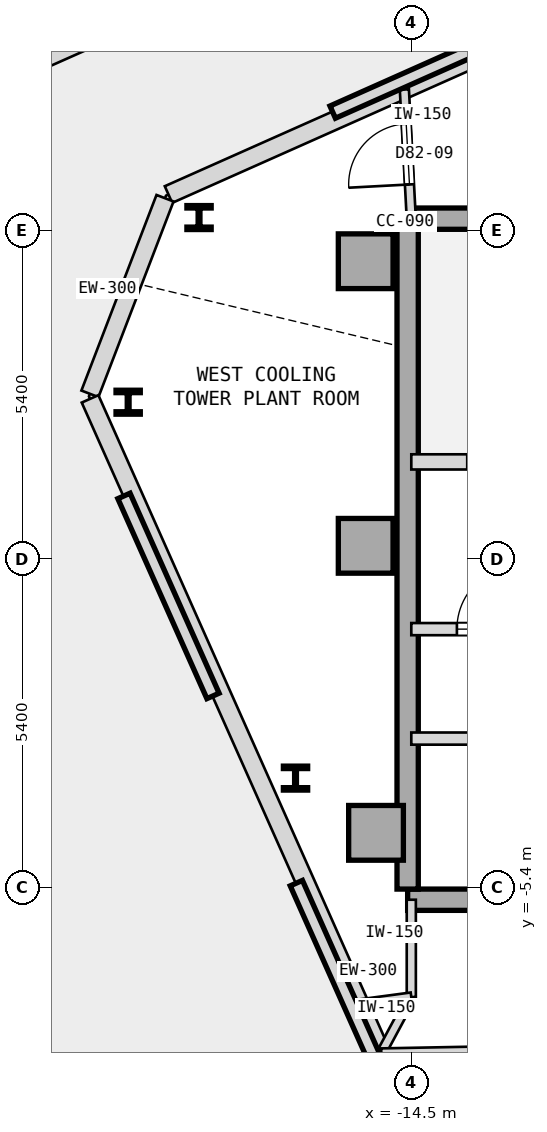
"""IFC4 building model, lengths in metres.
Left out: names, types, materials, properties, quantities, classifications, styles, units other than length and angle.
Written with IfcOpenShell. Run it as: python <this file> out.ifc"""

import sys

from ifc_helpers import new_model, si_unit, direction, frame, frame_2d, origin, origin_2d, place, context, subcontext, project, spatial, rectangle, i_section, extrude, element, fill, save


model = new_model("IFC4")
c1 = context("Model", 3, precision=1e-05, world=origin(), true_north=direction((0.0, 1.0)))
c2 = subcontext(c1, "Body", "Model", "MODEL_VIEW")
j1 = project(units=[si_unit("LENGTHUNIT", "METRE"), si_unit("PLANEANGLEUNIT", "RADIAN")], contexts=[c1])
p1 = place(None, origin())
s1 = spatial("IfcSite", under=j1, at=p1, CompositionType="ELEMENT")
p2 = place(p1, origin())
s2 = spatial("IfcBuilding", under=s1, at=p2, CompositionType="ELEMENT")
p3 = place(p2, frame((0.0, 0.0, 305.55)))
s3 = spatial("IfcBuildingStorey", under=s2, at=p3, CompositionType="ELEMENT", Elevation=305.55)
for number, where, z_axis, x_axis in (
    (1, (-15.25, 4.9, 0.0), (0.0, 0.0, 1.0), (1.0, 0.0, 0.0)),
    (2, (-15.25, 0.22, 0.0), (0.0, 0.0, 1.0), (1.0, 0.0, 0.0)),
    (3, (-15.08, -4.5, 0.0), (0.0, 0.0, 1.0), (1.0, 0.0, 0.0)),
):
    element("IfcColumn", number, at=place(p3, frame(where, z_axis=z_axis, x_axis=x_axis)), inside=s3, PredefinedType="COLUMN", context=c2, shape_type="SweptSolid", body=[
        extrude(rectangle(XDim=0.9, YDim=0.9, at=origin_2d()), origin(), (0.0, 0.0, 1.0), 6.45),
    ])
p4 = place(p3, frame((-14.56, 5.6, 0.0), z_axis=(0.0, 0.0, 1.0), x_axis=(1.0, 0.0, 0.0)))
e4 = element("IfcWall", 4, at=p4, inside=s3, PredefinedType="SHEAR", context=c2, shape_type="SweptSolid", body=[
    extrude(rectangle(XDim=11.41, YDim=0.35, at=frame_2d((5.705, 0.0))), origin(), (0.0, 0.0, 1.0), 6.1),
])
p5 = place(p3, frame((-14.56, -5.6, 0.0), z_axis=(0.0, 0.0, 1.0), x_axis=(1.0, 0.0, 0.0)))
e5 = element("IfcWall", 5, at=p5, inside=s3, PredefinedType="SHEAR", context=c2, shape_type="SweptSolid", body=[
    extrude(rectangle(XDim=10.86, YDim=0.35, at=frame_2d((5.43, 0.0))), origin(), (0.0, 0.0, 1.0), 6.1),
])
p6 = place(p3, frame((-14.56, -5.425, 0.0), z_axis=(0.0, 0.0, 1.0), x_axis=(0.0, 1.0, 0.0)))
e6 = element("IfcWall", 6, at=p6, inside=s3, PredefinedType="SHEAR", context=c2, shape_type="SweptSolid", body=[
    extrude(rectangle(XDim=10.85, YDim=0.35, at=frame_2d((5.425, 0.0))), origin(), (0.0, 0.0, 1.0), 6.1),
])
for number, where, z_axis, x_axis in (
    (7, (-17.99, 5.618, 0.0), (0.0, 0.0, 1.0), (1.0, 0.0, 0.0)),
    (8, (-19.156, 2.582, 0.0), (0.0, 0.0, 1.0), (1.0, 0.0, 0.0)),
    (9, (-16.404, -3.6, 0.0), (0.0, 0.0, 1.0), (1.0, 0.0, 0.0)),
):
    element("IfcColumn", number, at=place(p3, frame(where, z_axis=z_axis, x_axis=x_axis)), inside=s3, PredefinedType="COLUMN", context=c2, shape_type="SweptSolid", body=[
        extrude(i_section(OverallWidth=0.399, OverallDepth=0.394, WebThickness=0.023, FlangeThickness=0.037, FilletRadius=0.015, at=origin_2d()), origin(), (0.0, 0.0, 1.0), 6.45),
    ])
p7 = place(p3, frame((7.918, 17.756, 0.0), z_axis=(0.0, 0.0, 1.0), x_axis=(-0.913542158844, -0.406744052217, 0.0)))
e10 = element("IfcWall", 10, at=p7, inside=s3, PredefinedType="STANDARD", context=c2, shape_type="SweptSolid", body=[
    extrude(rectangle(XDim=28.91, YDim=0.3, at=frame_2d((14.455, 0.0))), origin(), (0.0, 0.0, 1.0), 6.1),
])
p8 = place(p3, frame((-18.55, 5.936, 0.0), z_axis=(0.0, 0.0, 1.0), x_axis=(-0.358404469556, -0.933566406959, 0.0)))
e11 = element("IfcWall", 11, at=p8, inside=s3, PredefinedType="STANDARD", context=c2, shape_type="SweptSolid", body=[
    extrude(rectangle(XDim=3.446, YDim=0.3, at=frame_2d((1.723, 0.0))), origin(), (0.0, 0.0, 1.0), 6.1),
])
p9 = place(p3, frame((-19.783, 2.637, 0.0), z_axis=(0.0, 0.0, 1.0), x_axis=(0.406736369999, -0.913545579224, 0.0)))
e12 = element("IfcWall", 12, at=p9, inside=s3, PredefinedType="STANDARD", context=c2, shape_type="SweptSolid", body=[
    extrude(rectangle(XDim=20.91, YDim=0.3, at=frame_2d((10.455, 0.0))), origin(), (0.0, 0.0, 1.0), 6.1),
])
p10 = place(p3, frame((18.04, 25.361, 0.0), z_axis=(0.0, 0.0, 1.0), x_axis=(-0.913545087995, -0.406737473317, 0.0)))
e13 = element("IfcWall", 13, at=p10, inside=s3, PredefinedType="PARAPET", context=c2, shape_type="SweptSolid", body=[
    extrude(rectangle(XDim=51.158, YDim=0.22, at=frame_2d((25.579, 0.0))), origin(), (0.0, 0.0, 1.0), 1.2),
])
p11 = place(p3, frame((-30.176, 0.697, 0.0), z_axis=(0.0, 0.0, 1.0), x_axis=(0.406735007391, -0.913546185895, 0.0)))
e14 = element("IfcWall", 14, at=p11, inside=s3, PredefinedType="PARAPET", context=c2, shape_type="SweptSolid", body=[
    extrude(rectangle(XDim=32.158, YDim=0.22, at=frame_2d((16.079, 0.0))), origin(), (0.0, 0.0, 1.0), 1.2),
])
p12 = place(p3, frame((-14.5, 1.6, 0.0), z_axis=(0.0, 0.0, 1.0), x_axis=(1.0, 0.0, 0.0)))
e15 = element("IfcWall", 15, at=p12, inside=s3, PredefinedType="STANDARD", context=c2, shape_type="SweptSolid", body=[
    extrude(rectangle(XDim=3.6, YDim=0.25, at=frame_2d((1.8, 0.0))), origin(), (0.0, 0.0, 1.0), 6.1),
])
p13 = place(p12, frame((0.92, 0.0, 0.0)))
e16 = element("IfcOpeningElement", 16, at=p13, cuts=e15, PredefinedType="OPENING", context=c2, shape_type="SweptSolid", body=[
    extrude(rectangle(XDim=1.05, YDim=2.15, at=frame_2d((0.525, 1.075))), frame((0.0, 0.135, 0.0), z_axis=(0.0, -1.0, 0.0), x_axis=(1.0, 0.0, 0.0)), (0.0, 0.0, 1.0), 0.27),
])
p14 = place(p3, frame((-14.5, -1.15, 0.0), z_axis=(0.0, 0.0, 1.0), x_axis=(1.0, 0.0, 0.0)))
e17 = element("IfcWall", 17, at=p14, inside=s3, PredefinedType="STANDARD", context=c2, shape_type="SweptSolid", body=[
    extrude(rectangle(XDim=2.95, YDim=0.2, at=frame_2d((1.475, 0.0))), origin(), (0.0, 0.0, 1.0), 6.1),
])
p15 = place(p14, frame((0.75, 0.0, 0.0)))
e18 = element("IfcOpeningElement", 18, at=p15, cuts=e17, PredefinedType="OPENING", context=c2, shape_type="SweptSolid", body=[
    extrude(rectangle(XDim=1.05, YDim=2.18, at=frame_2d((0.525, 1.09))), frame((0.0, 0.11, 0.0), z_axis=(0.0, -1.0, 0.0), x_axis=(1.0, 0.0, 0.0)), (0.0, 0.0, 1.0), 0.22),
])
p16 = place(p3, frame((-14.5, -2.95, 0.0), z_axis=(0.0, 0.0, 1.0), x_axis=(1.0, 0.0, 0.0)))
e19 = element("IfcWall", 19, at=p16, inside=s3, PredefinedType="STANDARD", context=c2, shape_type="SweptSolid", body=[
    extrude(rectangle(XDim=10.8, YDim=0.2, at=frame_2d((5.4, 0.0))), origin(), (0.0, 0.0, 1.0), 6.1),
])
p17 = place(p16, frame((1.73, 0.0, 0.0)))
e20 = element("IfcOpeningElement", 20, at=p17, cuts=e19, PredefinedType="OPENING", context=c2, shape_type="SweptSolid", body=[
    extrude(rectangle(XDim=0.92, YDim=2.15, at=frame_2d((0.46, 1.075))), frame((0.0, 0.11, 0.0), z_axis=(0.0, -1.0, 0.0), x_axis=(1.0, 0.0, 0.0)), (0.0, 0.0, 1.0), 0.22),
])
p18 = place(p16, frame((6.05, 0.0, 0.0)))
e21 = element("IfcOpeningElement", 21, at=p18, cuts=e19, PredefinedType="OPENING", context=c2, shape_type="SweptSolid", body=[
    extrude(rectangle(XDim=0.92, YDim=2.15, at=frame_2d((0.46, 1.075))), frame((0.0, 0.11, 0.0), z_axis=(0.0, -1.0, 0.0), x_axis=(1.0, 0.0, 0.0)), (0.0, 0.0, 1.0), 0.22),
])
p19 = place(p3, frame((-14.5, -7.2, 0.0), z_axis=(0.0, 0.0, 1.0), x_axis=(0.0, 1.0, 0.0)))
e22 = element("IfcWall", 22, at=p19, inside=s3, PredefinedType="PARTITIONING", context=c2, shape_type="SweptSolid", body=[
    extrude(rectangle(XDim=1.6, YDim=0.15, at=frame_2d((0.8, 0.0))), origin(), (0.0, 0.0, 1.0), 6.1),
])
p20 = place(p3, frame((-14.5, 5.6, 0.0), z_axis=(0.0, 0.0, 1.0), x_axis=(-0.053607139023, 0.99856210355, 0.0)))
e23 = element("IfcWall", 23, at=p20, inside=s3, PredefinedType="PARTITIONING", context=c2, shape_type="SweptSolid", body=[
    extrude(rectangle(XDim=2.127, YDim=0.15, at=frame_2d((1.063, 0.0))), origin(), (0.0, 0.0, 1.0), 6.1),
])
p21 = place(p20, frame((0.563, 0.0, 0.0)))
e24 = element("IfcOpeningElement", 24, at=p21, cuts=e23, PredefinedType="OPENING", context=c2, shape_type="SweptSolid", body=[
    extrude(rectangle(XDim=1.0, YDim=2.15, at=frame_2d((0.5, 1.075))), frame((0.0, 0.085, 0.0), z_axis=(0.0, -1.0, 0.0), x_axis=(1.0, 0.0, 0.0)), (0.0, 0.0, 1.0), 0.17),
])
p22 = place(p3, frame((-14.994, -8.12, 0.0), z_axis=(0.0, 0.0, 1.0), x_axis=(0.472844275985, 0.881146009847, 0.0)))
e25 = element("IfcWall", 25, at=p22, inside=s3, PredefinedType="PARTITIONING", context=c2, shape_type="SweptSolid", body=[
    extrude(rectangle(XDim=1.044, YDim=0.15, at=frame_2d((0.522, 0.0))), origin(), (0.0, 0.0, 1.0), 6.1),
])
p23 = place(p3, frame((-14.994, -8.12, 0.0), z_axis=(0.0, 0.0, 1.0), x_axis=(0.99981691014, 0.019134947025, 0.0)))
e26 = element("IfcWall", 26, at=p23, inside=s3, PredefinedType="PARTITIONING", context=c2, shape_type="SweptSolid", body=[
    extrude(rectangle(XDim=11.496, YDim=0.15, at=frame_2d((5.748, 0.0))), origin(), (0.0, 0.0, 1.0), 6.1),
])
p24 = place(p23, frame((6.972, 0.0, 0.0)))
e27 = element("IfcOpeningElement", 27, at=p24, cuts=e26, PredefinedType="OPENING", context=c2, shape_type="SweptSolid", body=[
    extrude(rectangle(XDim=1.0, YDim=2.15, at=frame_2d((0.5, 1.075))), frame((0.0, 0.085, 0.0), z_axis=(0.0, -1.0, 0.0), x_axis=(1.0, 0.0, 0.0)), (0.0, 0.0, 1.0), 0.17),
])
p25 = place(p3, frame((-15.353, -7.314, 0.0), z_axis=(0.0, 0.0, 1.0), x_axis=(0.991213020037, 0.132275277015, 0.0)))
e28 = element("IfcWall", 28, at=p25, inside=s3, PredefinedType="PARTITIONING", context=c2, shape_type="SweptSolid", body=[
    extrude(rectangle(XDim=0.86, YDim=0.15, at=frame_2d((0.43, 0.0))), origin(), (0.0, 0.0, 1.0), 6.1),
])
p26 = place(p15, origin())
e29 = element("IfcDoor", 29, at=p26, inside=s3, OperationType="SINGLE_SWING_RIGHT", PredefinedType="DOOR", context=c2, shape_type="SweptSolid", body=[
    extrude(rectangle(XDim=1.05, YDim=2.18, at=frame_2d((0.525, 1.09))), frame((0.0, 0.025, 0.0), z_axis=(0.0, -1.0, 0.0), x_axis=(1.0, 0.0, 0.0)), (0.0, 0.0, 1.0), 0.05),
])
fill(e18, e29)
p27 = place(p21, origin())
e30 = element("IfcDoor", 30, at=p27, inside=s3, OperationType="SINGLE_SWING_LEFT", PredefinedType="DOOR", context=c2, shape_type="SweptSolid", body=[
    extrude(rectangle(XDim=1.0, YDim=2.15, at=frame_2d((0.5, 1.075))), frame((0.0, 0.025, 0.0), z_axis=(0.0, -1.0, 0.0), x_axis=(1.0, 0.0, 0.0)), (0.0, 0.0, 1.0), 0.05),
])
fill(e24, e30)
save(model, sys.argv[1])
